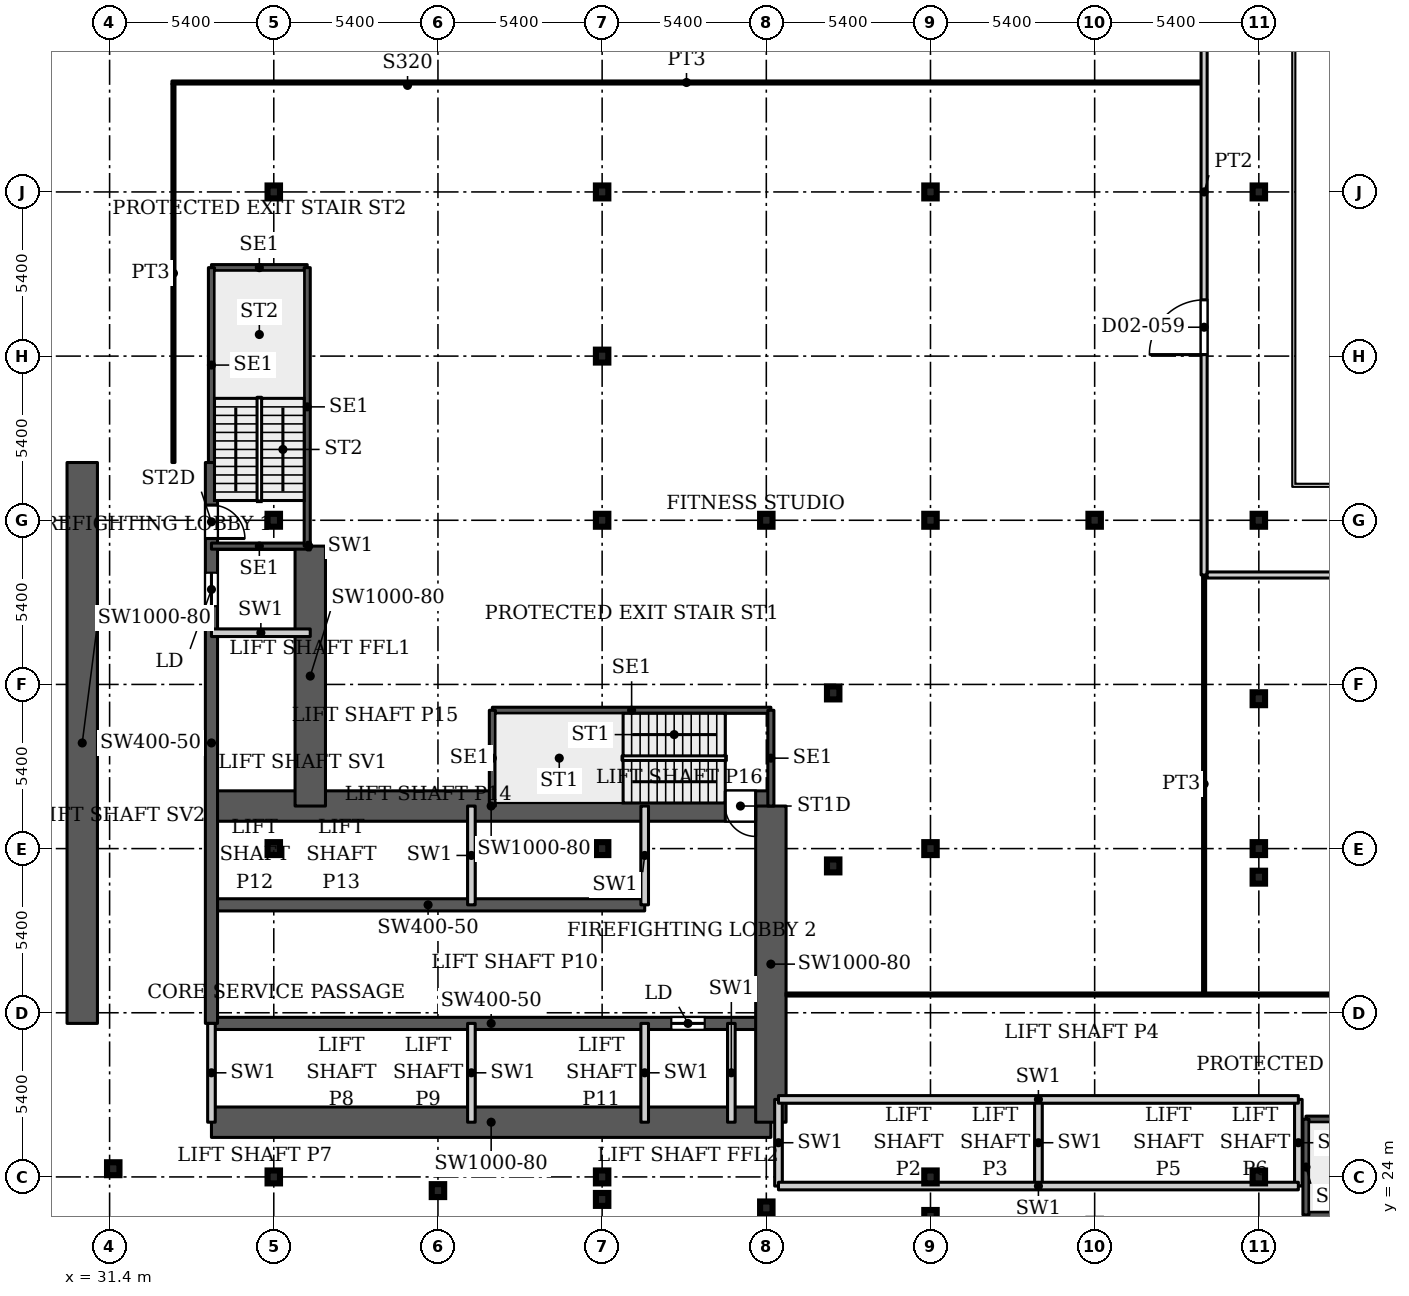
"""IFC4 building model, lengths in metres.
Left out: names, types, materials, properties, quantities, classifications, styles, units other than length and angle.
Written with IfcOpenShell. Run it as: python <this file> out.ifc"""

import sys

from ifc_helpers import new_model, si_unit, direction, frame, frame_2d, origin, origin_2d, place, context, subcontext, project, spatial, rectangle, i_section, extrude, source, transform, mapped, element, fill, save


model = new_model("IFC4")
c1 = context("Model", 3, precision=1e-05, world=origin(), true_north=direction((0.0, 1.0)))
c2 = subcontext(c1, "Body", "Model", "MODEL_VIEW")
j1 = project(units=[si_unit("LENGTHUNIT", "METRE"), si_unit("PLANEANGLEUNIT", "RADIAN")], contexts=[c1])
p1 = place(None, origin())
s1 = spatial("IfcSite", under=j1, at=p1, CompositionType="ELEMENT")
p2 = place(p1, origin())
s2 = spatial("IfcBuilding", under=s1, at=p2, CompositionType="ELEMENT")
p3 = place(p2, frame((0.0, 0.0, 12.5)))
s3 = spatial("IfcBuildingStorey", under=s2, at=p3, CompositionType="ELEMENT", Elevation=12.5)
for number, where, z_axis, x_axis in (
    (1, (36.8, 24.0, 0.0), (0.0, 0.0, 1.0), (1.0, 0.0, 0.0)),
    (2, (47.6, 24.0, 0.0), (0.0, 0.0, 1.0), (1.0, 0.0, 0.0)),
    (3, (58.4, 24.0, 0.0), (0.0, 0.0, 1.0), (1.0, 0.0, 0.0)),
    (4, (69.2, 24.0, 0.0), (0.0, 0.0, 1.0), (1.0, 0.0, 0.0)),
    (5, (36.8, 34.8, 0.0), (0.0, 0.0, 1.0), (1.0, 0.0, 0.0)),
    (6, (47.6, 34.8, 0.0), (0.0, 0.0, 1.0), (1.0, 0.0, 0.0)),
    (7, (58.4, 34.8, 0.0), (0.0, 0.0, 1.0), (1.0, 0.0, 0.0)),
    (8, (69.2, 34.8, 0.0), (0.0, 0.0, 1.0), (1.0, 0.0, 0.0)),
    (9, (36.8, 45.6, 0.0), (0.0, 0.0, 1.0), (1.0, 0.0, 0.0)),
    (10, (47.6, 45.6, 0.0), (0.0, 0.0, 1.0), (1.0, 0.0, 0.0)),
    (11, (58.4, 45.6, 0.0), (0.0, 0.0, 1.0), (1.0, 0.0, 0.0)),
    (12, (69.2, 45.6, 0.0), (0.0, 0.0, 1.0), (1.0, 0.0, 0.0)),
    (13, (36.8, 56.4, 0.0), (0.0, 0.0, 1.0), (1.0, 0.0, 0.0)),
    (14, (47.6, 56.4, 0.0), (0.0, 0.0, 1.0), (1.0, 0.0, 0.0)),
    (15, (58.4, 56.4, 0.0), (0.0, 0.0, 1.0), (1.0, 0.0, 0.0)),
    (16, (69.2, 56.4, 0.0), (0.0, 0.0, 1.0), (1.0, 0.0, 0.0)),
    (17, (58.4, 22.7, 0.0), (0.0, 0.0, 1.0), (1.0, 0.0, 0.0)),
    (18, (53.0, 22.98, 0.0), (0.0, 0.0, 1.0), (1.0, 0.0, 0.0)),
    (19, (47.6, 23.26, 0.0), (0.0, 0.0, 1.0), (1.0, 0.0, 0.0)),
    (20, (42.2, 23.55, 0.0), (0.0, 0.0, 1.0), (1.0, 0.0, 0.0)),
    (21, (31.52, 24.27, 0.0), (0.0, 0.0, 1.0), (1.0, 0.0, 0.0)),
    (22, (53.0, 45.6, 0.0), (0.0, 0.0, 1.0), (1.0, 0.0, 0.0)),
    (23, (63.8, 45.6, 0.0), (0.0, 0.0, 1.0), (1.0, 0.0, 0.0)),
    (24, (47.6, 51.0, 0.0), (0.0, 0.0, 1.0), (1.0, 0.0, 0.0)),
    (25, (69.2, 33.86, 0.0), (0.0, 0.0, 1.0), (1.0, 0.0, 0.0)),
    (26, (55.2, 34.23, 0.0), (0.0, 0.0, 1.0), (1.0, 0.0, 0.0)),
    (27, (69.2, 39.73, 0.0), (0.0, 0.0, 1.0), (1.0, 0.0, 0.0)),
    (28, (55.2, 39.92, 0.0), (0.0, 0.0, 1.0), (1.0, 0.0, 0.0)),
):
    element("IfcColumn", number, at=place(p3, frame(where, z_axis=z_axis, x_axis=x_axis)), inside=s3, PredefinedType="COLUMN", context=c2, shape_type="SweptSolid", body=[
        extrude(i_section(OverallWidth=0.409, OverallDepth=0.425, WebThickness=0.033, FlangeThickness=0.052, FilletRadius=0.013, at=origin_2d()), origin(), (0.0, 0.0, 1.0), 4.5),
    ])
p4 = place(p3, frame((34.75, 25.8, 0.0), z_axis=(0.0, 0.0, 1.0), x_axis=(1.0, 0.0, 0.0)))
e29 = element("IfcWall", 29, at=p4, inside=s3, PredefinedType="SHEAR", context=c2, shape_type="SweptSolid", body=[
    extrude(rectangle(XDim=18.4, YDim=1.0, at=frame_2d((9.2, 0.0))), origin(), (0.0, 0.0, 1.0), 4.5),
])
p5 = place(p3, frame((34.75, 29.05, 0.0), z_axis=(0.0, 0.0, 1.0), x_axis=(1.0, 0.0, 0.0)))
e30 = element("IfcWall", 30, at=p5, inside=s3, PredefinedType="SHEAR", context=c2, shape_type="SweptSolid", body=[
    extrude(rectangle(XDim=18.4, YDim=0.4, at=frame_2d((9.2, 0.0))), origin(), (0.0, 0.0, 1.0), 4.5),
])
p6 = place(p5, frame((15.125, 0.0, 0.0)))
e31 = element("IfcOpeningElement", 31, at=p6, cuts=e30, PredefinedType="OPENING", context=c2, shape_type="SweptSolid", body=[
    extrude(rectangle(XDim=1.1, YDim=2.2, at=frame_2d((0.55, 1.1))), frame((0.0, 0.21, 0.0), z_axis=(0.0, -1.0, 0.0), x_axis=(1.0, 0.0, 0.0)), (0.0, 0.0, 1.0), 0.42),
])
p7 = place(p3, frame((34.75, 32.95, 0.0), z_axis=(0.0, 0.0, 1.0), x_axis=(1.0, 0.0, 0.0)))
e32 = element("IfcWall", 32, at=p7, inside=s3, PredefinedType="SHEAR", context=c2, shape_type="SweptSolid", body=[
    extrude(rectangle(XDim=14.25, YDim=0.4, at=frame_2d((7.125, 0.0))), origin(), (0.0, 0.0, 1.0), 4.5),
])
p8 = place(p3, frame((34.75, 36.2, 0.0), z_axis=(0.0, 0.0, 1.0), x_axis=(1.0, 0.0, 0.0)))
e33 = element("IfcWall", 33, at=p8, inside=s3, PredefinedType="SHEAR", context=c2, shape_type="SweptSolid", body=[
    extrude(rectangle(XDim=18.4, YDim=1.0, at=frame_2d((9.2, 0.0))), origin(), (0.0, 0.0, 1.0), 4.5),
])
p9 = place(p8, frame((16.9, 0.0, 0.0)))
e34 = element("IfcOpeningElement", 34, at=p9, cuts=e33, PredefinedType="OPENING", context=c2, shape_type="SweptSolid", body=[
    extrude(rectangle(XDim=1.0, YDim=2.2, at=frame_2d((0.5, 1.1))), frame((0.0, 0.51, 0.0), z_axis=(0.0, -1.0, 0.0), x_axis=(1.0, 0.0, 0.0)), (0.0, 0.0, 1.0), 1.02),
])
p10 = place(p3, frame((34.75, 29.05, 0.0), z_axis=(0.0, 0.0, 1.0), x_axis=(0.0, 1.0, 0.0)))
e35 = element("IfcWall", 35, at=p10, inside=s3, PredefinedType="SHEAR", context=c2, shape_type="SweptSolid", body=[
    extrude(rectangle(XDim=18.45, YDim=0.4, at=frame_2d((9.225, 0.0))), origin(), (0.0, 0.0, 1.0), 4.5),
])
p11 = place(p10, frame((13.725, 0.0, 0.0)))
e36 = element("IfcOpeningElement", 36, at=p11, cuts=e35, PredefinedType="OPENING", context=c2, shape_type="SweptSolid", body=[
    extrude(rectangle(XDim=1.1, YDim=2.2, at=frame_2d((0.55, 1.1))), frame((0.0, 0.21, 0.0), z_axis=(0.0, -1.0, 0.0), x_axis=(1.0, 0.0, 0.0)), (0.0, 0.0, 1.0), 0.42),
])
p12 = place(p10, frame((15.95, 0.0, 0.0)))
e37 = element("IfcOpeningElement", 37, at=p12, cuts=e35, PredefinedType="OPENING", context=c2, shape_type="SweptSolid", body=[
    extrude(rectangle(XDim=1.1, YDim=2.2, at=frame_2d((0.55, 1.1))), frame((0.0, 0.21, 0.0), z_axis=(0.0, -1.0, 0.0), x_axis=(1.0, 0.0, 0.0)), (0.0, 0.0, 1.0), 0.42),
])
p13 = place(p3, frame((38.0, 36.2, 0.0), z_axis=(0.0, 0.0, 1.0), x_axis=(0.0, 1.0, 0.0)))
e38 = element("IfcWall", 38, at=p13, inside=s3, PredefinedType="SHEAR", context=c2, shape_type="SweptSolid", body=[
    extrude(rectangle(XDim=8.55, YDim=1.0, at=frame_2d((4.275, 0.0))), origin(), (0.0, 0.0, 1.0), 4.5),
])
p14 = place(p3, frame((30.5, 29.05, 0.0), z_axis=(0.0, 0.0, 1.0), x_axis=(0.0, 1.0, 0.0)))
e39 = element("IfcWall", 39, at=p14, inside=s3, PredefinedType="SHEAR", context=c2, shape_type="SweptSolid", body=[
    extrude(rectangle(XDim=18.45, YDim=1.0, at=frame_2d((9.225, 0.0))), origin(), (0.0, 0.0, 1.0), 4.5),
])
p15 = place(p3, frame((53.15, 25.8, 0.0), z_axis=(0.0, 0.0, 1.0), x_axis=(0.0, 1.0, 0.0)))
e40 = element("IfcWall", 40, at=p15, inside=s3, PredefinedType="SHEAR", context=c2, shape_type="SweptSolid", body=[
    extrude(rectangle(XDim=10.4, YDim=1.0, at=frame_2d((5.2, 0.0))), origin(), (0.0, 0.0, 1.0), 4.5),
])
p16 = place(p3, frame((43.99, 39.35, 0.0), z_axis=(0.0, 0.0, 1.0), x_axis=(1.0, 0.0, 0.0)))
e41 = element("IfcWall", 41, at=p16, inside=s3, PredefinedType="SHEAR", context=c2, shape_type="SweptSolid", body=[
    extrude(rectangle(XDim=9.16, YDim=0.2, at=frame_2d((4.58, 0.0))), origin(), (0.0, 0.0, 1.0), 4.5),
])
for number, where, z_axis, x_axis in (
    (42, (43.99, 36.2, 0.0), (0.0, 0.0, 1.0), (0.0, 1.0, 0.0)),
    (43, (53.15, 36.2, 0.0), (0.0, 0.0, 1.0), (0.0, 1.0, 0.0)),
):
    element("IfcWall", number, at=place(p3, frame(where, z_axis=z_axis, x_axis=x_axis)), inside=s3, PredefinedType="SHEAR", context=c2, shape_type="SweptSolid", body=[
        extrude(rectangle(XDim=3.15, YDim=0.2, at=frame_2d((1.575, 0.0))), origin(), (0.0, 0.0, 1.0), 4.5),
    ])
for number, where, z_axis, x_axis in (
    (44, (34.75, 44.75, 0.0), (0.0, 0.0, 1.0), (1.0, 0.0, 0.0)),
    (45, (34.75, 53.91, 0.0), (0.0, 0.0, 1.0), (1.0, 0.0, 0.0)),
):
    element("IfcWall", number, at=place(p3, frame(where, z_axis=z_axis, x_axis=x_axis)), inside=s3, PredefinedType="SHEAR", context=c2, shape_type="SweptSolid", body=[
        extrude(rectangle(XDim=3.15, YDim=0.2, at=frame_2d((1.575, 0.0))), origin(), (0.0, 0.0, 1.0), 4.5),
    ])
p17 = place(p3, frame((34.75, 47.5, 0.0), z_axis=(0.0, 0.0, 1.0), x_axis=(0.0, 1.0, 0.0)))
e46 = element("IfcWall", 46, at=p17, inside=s3, PredefinedType="SHEAR", context=c2, shape_type="SweptSolid", body=[
    extrude(rectangle(XDim=6.41, YDim=0.2, at=frame_2d((3.205, 0.0))), origin(), (0.0, 0.0, 1.0), 4.5),
])
for number, where, z_axis, x_axis in (
    (47, (37.9, 44.75, 0.0), (0.0, 0.0, 1.0), (0.0, 1.0, 0.0)),
    (48, (70.75, 22.75, 0.0), (0.0, 0.0, 1.0), (1.0, 0.0, 0.0)),
    (49, (70.75, 25.9, 0.0), (0.0, 0.0, 1.0), (1.0, 0.0, 0.0)),
):
    element("IfcWall", number, at=place(p3, frame(where, z_axis=z_axis, x_axis=x_axis)), inside=s3, PredefinedType="SHEAR", context=c2, shape_type="SweptSolid", body=[
        extrude(rectangle(XDim=9.16, YDim=0.2, at=frame_2d((4.58, 0.0))), origin(), (0.0, 0.0, 1.0), 4.5),
    ])
p18 = place(p3, frame((70.75, 22.75, 0.0), z_axis=(0.0, 0.0, 1.0), x_axis=(0.0, 1.0, 0.0)))
e50 = element("IfcWall", 50, at=p18, inside=s3, PredefinedType="SHEAR", context=c2, shape_type="SweptSolid", body=[
    extrude(rectangle(XDim=3.15, YDim=0.2, at=frame_2d((1.575, 0.0))), origin(), (0.0, 0.0, 1.0), 4.5),
])
for number, where, z_axis, x_axis in (
    (51, (34.75, 25.8, 0.0), (0.0, 0.0, 1.0), (0.0, 1.0, 0.0)),
    (52, (43.3, 25.8, 0.0), (0.0, 0.0, 1.0), (0.0, 1.0, 0.0)),
    (53, (43.3, 32.95, 0.0), (0.0, 0.0, 1.0), (0.0, 1.0, 0.0)),
    (54, (49.0, 25.8, 0.0), (0.0, 0.0, 1.0), (0.0, 1.0, 0.0)),
    (55, (49.0, 32.95, 0.0), (0.0, 0.0, 1.0), (0.0, 1.0, 0.0)),
    (56, (51.85, 25.8, 0.0), (0.0, 0.0, 1.0), (0.0, 1.0, 0.0)),
):
    element("IfcWall", number, at=place(p3, frame(where, z_axis=z_axis, x_axis=x_axis)), inside=s3, PredefinedType="PARTITIONING", context=c2, shape_type="SweptSolid", body=[
        extrude(rectangle(XDim=3.25, YDim=0.25, at=frame_2d((1.625, 0.0))), origin(), (0.0, 0.0, 1.0), 4.5),
    ])
for number, where, z_axis, x_axis in (
    (57, (53.4, 23.7, 0.0), (0.0, 0.0, 1.0), (0.0, 1.0, 0.0)),
    (58, (61.95, 23.7, 0.0), (0.0, 0.0, 1.0), (0.0, 1.0, 0.0)),
    (59, (70.5, 23.7, 0.0), (0.0, 0.0, 1.0), (0.0, 1.0, 0.0)),
):
    element("IfcWall", number, at=place(p3, frame(where, z_axis=z_axis, x_axis=x_axis)), inside=s3, PredefinedType="PARTITIONING", context=c2, shape_type="SweptSolid", body=[
        extrude(rectangle(XDim=2.85, YDim=0.25, at=frame_2d((1.425, 0.0))), origin(), (0.0, 0.0, 1.0), 4.5),
    ])
for number, where, z_axis, x_axis in (
    (60, (53.4, 23.7, 0.0), (0.0, 0.0, 1.0), (1.0, 0.0, 0.0)),
    (61, (53.4, 26.55, 0.0), (0.0, 0.0, 1.0), (1.0, 0.0, 0.0)),
):
    element("IfcWall", number, at=place(p3, frame(where, z_axis=z_axis, x_axis=x_axis)), inside=s3, PredefinedType="PARTITIONING", context=c2, shape_type="SweptSolid", body=[
        extrude(rectangle(XDim=17.1, YDim=0.25, at=frame_2d((8.55, 0.0))), origin(), (0.0, 0.0, 1.0), 4.5),
    ])
p19 = place(p3, frame((34.75, 41.9, 0.0), z_axis=(0.0, 0.0, 1.0), x_axis=(1.0, 0.0, 0.0)))
e62 = element("IfcWall", 62, at=p19, inside=s3, PredefinedType="PARTITIONING", context=c2, shape_type="SweptSolid", body=[
    extrude(rectangle(XDim=3.25, YDim=0.25, at=frame_2d((1.625, 0.0))), origin(), (0.0, 0.0, 1.0), 4.5),
])
p20 = place(p3, frame((37.9, 44.75, 0.0), z_axis=(0.0, 0.0, 1.0), x_axis=(1.0, 0.0, 0.0)))
e63 = element("IfcWall", 63, at=p20, inside=s3, PredefinedType="PARTITIONING", context=c2, shape_type="SweptSolid", body=[
    extrude(rectangle(XDim=0.1, YDim=0.25, at=frame_2d((0.05, 0.0))), origin(), (0.0, 0.0, 1.0), 4.5),
])
p21 = place(p3, frame((33.45, 60.0, 0.0), z_axis=(0.0, 0.0, 1.0), x_axis=(1.0, 0.0, 0.0)))
e64 = element("IfcWall", 64, at=p21, inside=s3, PredefinedType="PARTITIONING", context=c2, shape_type="SweptSolid", body=[
    extrude(rectangle(XDim=33.85, YDim=0.1, at=frame_2d((16.925, 0.0))), origin(), (0.0, 0.0, 1.0), 4.18),
])
p22 = place(p3, frame((33.5, 47.5, 0.0), z_axis=(0.0, 0.0, 1.0), x_axis=(0.0, 1.0, 0.0)))
e65 = element("IfcWall", 65, at=p22, inside=s3, PredefinedType="PARTITIONING", context=c2, shape_type="SweptSolid", body=[
    extrude(rectangle(XDim=12.45, YDim=0.1, at=frame_2d((6.225, 0.0))), origin(), (0.0, 0.0, 1.0), 4.18),
])
p23 = place(p3, frame((53.649, 30.0, 0.0), z_axis=(0.0, 0.0, 1.0), x_axis=(1.0, 0.0, 0.0)))
e66 = element("IfcWall", 66, at=p23, inside=s3, PredefinedType="PARTITIONING", context=c2, shape_type="SweptSolid", body=[
    extrude(rectangle(XDim=38.301, YDim=0.1, at=frame_2d((19.15, 0.0))), origin(), (0.0, 0.0, 1.0), 4.18),
])
p24 = place(p3, frame((67.4, 30.05, 0.0), z_axis=(0.0, 0.0, 1.0), x_axis=(0.0, 1.0, 0.0)))
e67 = element("IfcWall", 67, at=p24, inside=s3, PredefinedType="PARTITIONING", context=c2, shape_type="SweptSolid", body=[
    extrude(rectangle(XDim=13.75, YDim=0.1, at=frame_2d((6.875, 0.0))), origin(), (0.0, 0.0, 1.0), 4.18),
])
p25 = place(p3, frame((67.4, 43.8, 0.0), z_axis=(0.0, 0.0, 1.0), x_axis=(0.0, 1.0, 0.0)))
e68 = element("IfcWall", 68, at=p25, inside=s3, PredefinedType="PARTITIONING", context=c2, shape_type="SweptSolid", body=[
    extrude(rectangle(XDim=25.2, YDim=0.2, at=frame_2d((12.6, 0.0))), origin(), (0.0, 0.0, 1.0), 4.18),
])
p26 = place(p25, frame((7.25, 0.0, 0.0)))
e69 = element("IfcOpeningElement", 69, at=p26, cuts=e68, PredefinedType="OPENING", context=c2, shape_type="SweptSolid", body=[
    extrude(rectangle(XDim=1.8, YDim=2.1, at=frame_2d((0.9, 1.05))), frame((0.0, 0.11, 0.0), z_axis=(0.0, -1.0, 0.0), x_axis=(1.0, 0.0, 0.0)), (0.0, 0.0, 1.0), 0.22),
])
p27 = place(p25, frame((19.75, 0.0, 0.0)))
e70 = element("IfcOpeningElement", 70, at=p27, cuts=e68, PredefinedType="OPENING", context=c2, shape_type="SweptSolid", body=[
    extrude(rectangle(XDim=1.8, YDim=2.1, at=frame_2d((0.9, 1.05))), frame((0.0, 0.11, 0.0), z_axis=(0.0, -1.0, 0.0), x_axis=(1.0, 0.0, 0.0)), (0.0, 0.0, 1.0), 0.22),
])
p28 = place(p3, frame((67.5, 43.8, 0.0), z_axis=(0.0, 0.0, 1.0), x_axis=(1.0, 0.0, 0.0)))
e71 = element("IfcWall", 71, at=p28, inside=s3, PredefinedType="PARTITIONING", context=c2, shape_type="SweptSolid", body=[
    extrude(rectangle(XDim=24.4, YDim=0.2, at=frame_2d((12.2, 0.0))), origin(), (0.0, 0.0, 1.0), 4.18),
])
p29 = place(p28, frame((11.3, 0.0, 0.0)))
e72 = element("IfcOpeningElement", 72, at=p29, cuts=e71, PredefinedType="OPENING", context=c2, shape_type="SweptSolid", body=[
    extrude(rectangle(XDim=1.8, YDim=2.1, at=frame_2d((0.9, 1.05))), frame((0.0, 0.11, 0.0), z_axis=(0.0, -1.0, 0.0), x_axis=(1.0, 0.0, 0.0)), (0.0, 0.0, 1.0), 0.22),
])
m1 = source(origin(), c2, "Body", "SweptSolid", [
    extrude(rectangle(XDim=1.1, YDim=2.2, at=frame_2d((0.55, 1.1))), frame((0.0, 0.025, 0.0), z_axis=(0.0, -1.0, 0.0), x_axis=(1.0, 0.0, 0.0)), (0.0, 0.0, 1.0), 0.05),
])
p30 = place(p11, origin())
e73 = element("IfcDoor", 73, at=p30, inside=s3, OperationType="SLIDING_TO_LEFT", PredefinedType="DOOR", context=c2, shape_type="MappedRepresentation", body=[
    mapped(m1, transform((0.0, 0.0, 0.0), x_axis=(1.0, 0.0, 0.0), y_axis=(0.0, 1.0, 0.0), z_axis=(0.0, 0.0, 1.0), scale=1.0)),
])
fill(e36, e73)
p31 = place(p6, origin())
e74 = element("IfcDoor", 74, at=p31, inside=s3, OperationType="SLIDING_TO_LEFT", PredefinedType="DOOR", context=c2, shape_type="MappedRepresentation", body=[
    mapped(m1, transform((0.0, 0.0, 0.0), x_axis=(1.0, 0.0, 0.0), y_axis=(0.0, 1.0, 0.0), z_axis=(0.0, 0.0, 1.0), scale=1.0)),
])
fill(e31, e74)
m2 = source(origin(), c2, "Body", "SweptSolid", [
    extrude(rectangle(XDim=1.0, YDim=2.2, at=frame_2d((0.5, 1.1))), frame((0.0, 0.025, 0.0), z_axis=(0.0, -1.0, 0.0), x_axis=(1.0, 0.0, 0.0)), (0.0, 0.0, 1.0), 0.05),
])
p32 = place(p9, origin())
e75 = element("IfcDoor", 75, at=p32, inside=s3, OperationType="SINGLE_SWING_RIGHT", PredefinedType="DOOR", context=c2, shape_type="MappedRepresentation", body=[
    mapped(m2, transform((0.0, 0.0, 0.0), x_axis=(1.0, 0.0, 0.0), y_axis=(0.0, 1.0, 0.0), z_axis=(0.0, 0.0, 1.0), scale=1.0)),
])
fill(e34, e75)
m3 = source(origin(), c2, "Body", "SweptSolid", [
    extrude(rectangle(XDim=1.1, YDim=2.2, at=frame_2d((0.55, 1.1))), frame((0.0, 0.025, 0.0), z_axis=(0.0, -1.0, 0.0), x_axis=(1.0, 0.0, 0.0)), (0.0, 0.0, 1.0), 0.05),
])
p33 = place(p12, origin())
e76 = element("IfcDoor", 76, at=p33, inside=s3, OperationType="SINGLE_SWING_RIGHT", PredefinedType="DOOR", context=c2, shape_type="MappedRepresentation", body=[
    mapped(m3, transform((0.0, 0.0, 0.0), x_axis=(1.0, 0.0, 0.0), y_axis=(0.0, 1.0, 0.0), z_axis=(0.0, 0.0, 1.0), scale=1.0)),
])
fill(e37, e76)
m4 = source(origin(), c2, "Body", "SweptSolid", [
    extrude(rectangle(XDim=1.8, YDim=2.1, at=frame_2d((0.9, 1.05))), frame((0.0, 0.025, 0.0), z_axis=(0.0, -1.0, 0.0), x_axis=(1.0, 0.0, 0.0)), (0.0, 0.0, 1.0), 0.05),
])
p34 = place(p26, origin())
e77 = element("IfcDoor", 77, at=p34, inside=s3, OperationType="DOUBLE_DOOR_SINGLE_SWING", PredefinedType="DOOR", context=c2, shape_type="MappedRepresentation", body=[
    mapped(m4, transform((0.0, 0.0, 0.0), x_axis=(1.0, 0.0, 0.0), y_axis=(0.0, 1.0, 0.0), z_axis=(0.0, 0.0, 1.0), scale=1.0)),
])
fill(e69, e77)
save(model, sys.argv[1])
